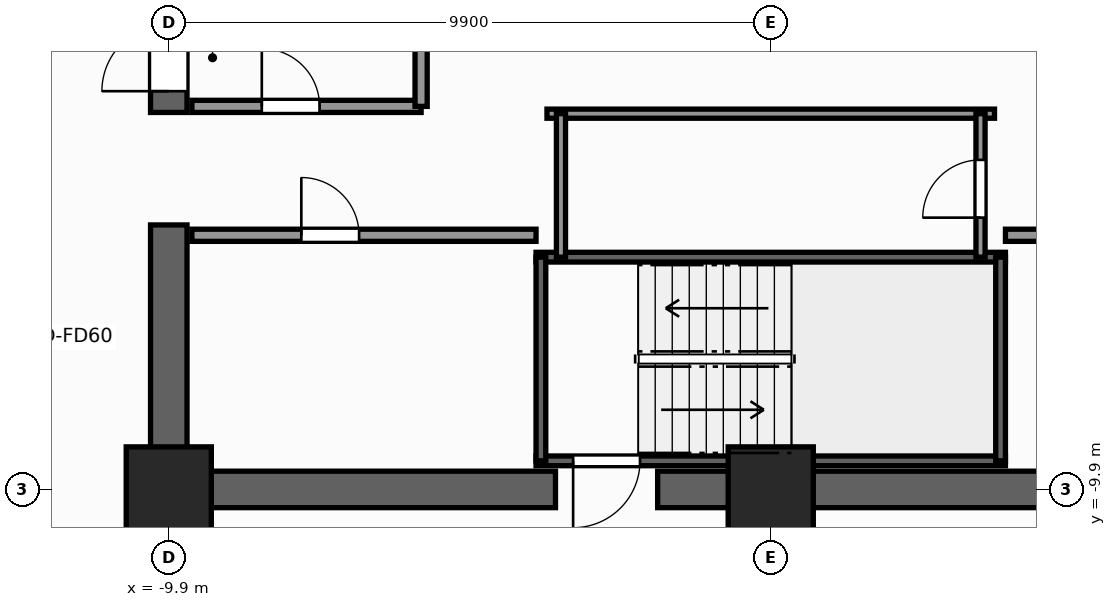
"""IFC4 building model, lengths in metres.
Left out: names, types, materials, properties, quantities, classifications, styles, units other than length and angle.
Written with IfcOpenShell. Run it as: python <this file> out.ifc"""

import sys

from ifc_helpers import new_model, si_unit, direction, frame, frame_2d, origin, origin_2d, place, context, subcontext, project, spatial, rectangle, extrude, element, fill, save


model = new_model("IFC4")
c1 = context("Model", 3, precision=1e-05, world=origin(), true_north=direction((0.0, 1.0)))
c2 = subcontext(c1, "Body", "Model", "MODEL_VIEW")
j1 = project(units=[si_unit("LENGTHUNIT", "METRE"), si_unit("PLANEANGLEUNIT", "RADIAN")], contexts=[c1])
p1 = place(None, origin())
s1 = spatial("IfcSite", under=j1, at=p1, CompositionType="ELEMENT")
p2 = place(p1, origin())
s2 = spatial("IfcBuilding", under=s1, at=p2, CompositionType="ELEMENT")
p3 = place(p2, frame((0.0, 0.0, 30.4)))
s3 = spatial("IfcBuildingStorey", under=s2, at=p3, CompositionType="ELEMENT", Elevation=30.4)
p4 = place(p3, frame((10.2, -9.9, 0.0), z_axis=(0.0, 0.0, 1.0), x_axis=(-1.0, 0.0, 0.0)))
e1 = element("IfcWall", 1, at=p4, inside=s3, PredefinedType="SHEAR", context=c2, shape_type="SweptSolid", body=[
    extrude(rectangle(XDim=12.06, YDim=0.6, at=frame_2d((6.03, 0.0))), origin(), (0.0, 0.0, 1.0), 3.3),
])
p5 = place(p3, frame((-3.54, -9.9, 0.0), z_axis=(0.0, 0.0, 1.0), x_axis=(-1.0, 0.0, 0.0)))
e2 = element("IfcWall", 2, at=p5, inside=s3, PredefinedType="SHEAR", context=c2, shape_type="SweptSolid", body=[
    extrude(rectangle(XDim=6.66, YDim=0.6, at=frame_2d((3.33, 0.0))), origin(), (0.0, 0.0, 1.0), 3.3),
])
p6 = place(p3, frame((-9.9, -9.6, 0.0), z_axis=(0.0, 0.0, 1.0), x_axis=(0.0, 1.0, 0.0)))
e3 = element("IfcWall", 3, at=p6, inside=s3, PredefinedType="SHEAR", context=c2, shape_type="SweptSolid", body=[
    extrude(rectangle(XDim=4.05, YDim=0.6, at=frame_2d((2.025, 0.0))), origin(), (0.0, 0.0, 1.0), 3.3),
])
p7 = place(p3, frame((-9.9, -3.7, 0.0), z_axis=(0.0, 0.0, 1.0), x_axis=(0.0, 1.0, 0.0)))
e4 = element("IfcWall", 4, at=p7, inside=s3, PredefinedType="SHEAR", context=c2, shape_type="SweptSolid", body=[
    extrude(rectangle(XDim=13.3, YDim=0.6, at=frame_2d((6.65, 0.0))), origin(), (0.0, 0.0, 1.0), 3.3),
])
p8 = place(p7, frame((0.35, 0.0, 0.0)))
e5 = element("IfcOpeningElement", 5, at=p8, cuts=e4, PredefinedType="OPENING", context=c2, shape_type="SweptSolid", body=[
    extrude(rectangle(XDim=1.1, YDim=2.2, at=frame_2d((0.55, 1.1))), frame((0.0, 0.31, 0.0), z_axis=(0.0, -1.0, 0.0), x_axis=(1.0, 0.0, 0.0)), (0.0, 0.0, 1.0), 0.62),
])
for number, where, z_axis, x_axis in (
    (6, (-9.9, -9.9, 0.0), (0.0, 0.0, 1.0), (1.0, 0.0, 0.0)),
    (7, (0.0, -9.9, 0.0), (0.0, 0.0, 1.0), (1.0, 0.0, 0.0)),
):
    element("IfcColumn", number, at=place(p3, frame(where, z_axis=z_axis, x_axis=x_axis)), inside=s3, PredefinedType="COLUMN", context=c2, shape_type="SweptSolid", body=[
        extrude(rectangle(XDim=1.4, YDim=1.4, at=origin_2d()), origin(), (0.0, 0.0, 1.0), 3.3),
    ])
p9 = place(p3, frame((3.86, -9.43, 0.0), z_axis=(0.0, 0.0, 1.0), x_axis=(-1.0, 0.0, 0.0)))
e8 = element("IfcWall", 8, at=p9, inside=s3, PredefinedType="SHEAR", context=c2, shape_type="SweptSolid", body=[
    extrude(rectangle(XDim=7.72, YDim=0.16, at=frame_2d((3.86, 0.0))), origin(), (0.0, 0.0, 1.0), 3.3),
])
p10 = place(p9, frame((6.01, 0.0, 0.0)))
e9 = element("IfcOpeningElement", 9, at=p10, cuts=e8, PredefinedType="OPENING", context=c2, shape_type="SweptSolid", body=[
    extrude(rectangle(XDim=1.1, YDim=2.2, at=frame_2d((0.55, 1.1))), frame((0.0, 0.09, 0.0), z_axis=(0.0, -1.0, 0.0), x_axis=(1.0, 0.0, 0.0)), (0.0, 0.0, 1.0), 0.18),
])
p11 = place(p3, frame((-3.86, -6.08, 0.0), z_axis=(0.0, 0.0, 1.0), x_axis=(1.0, 0.0, 0.0)))
e10 = element("IfcWall", 10, at=p11, inside=s3, PredefinedType="SHEAR", context=c2, shape_type="SweptSolid", body=[
    extrude(rectangle(XDim=7.72, YDim=0.16, at=frame_2d((3.86, 0.0))), origin(), (0.0, 0.0, 1.0), 3.3),
])
for number, where, z_axis, x_axis in (
    (11, (-3.78, -9.43, 0.0), (0.0, 0.0, 1.0), (0.0, 1.0, 0.0)),
    (12, (3.78, -9.43, 0.0), (0.0, 0.0, 1.0), (0.0, 1.0, 0.0)),
):
    element("IfcWall", number, at=place(p3, frame(where, z_axis=z_axis, x_axis=x_axis)), inside=s3, PredefinedType="SHEAR", context=c2, shape_type="SweptSolid", body=[
        extrude(rectangle(XDim=3.35, YDim=0.16, at=frame_2d((1.675, 0.0))), origin(), (0.0, 0.0, 1.0), 3.3),
    ])
p12 = place(p3, frame((-9.52, -3.6, 0.0), z_axis=(0.0, 0.0, 1.0), x_axis=(1.0, 0.0, 0.0)))
e13 = element("IfcWall", 13, at=p12, inside=s3, PredefinedType="SOLIDWALL", context=c2, shape_type="SweptSolid", body=[
    extrude(rectangle(XDim=3.77, YDim=0.2, at=frame_2d((1.885, 0.0))), origin(), (0.0, 0.0, 1.0), 3.06),
])
p13 = place(p12, frame((1.15, 0.0, 0.0)))
e14 = element("IfcOpeningElement", 14, at=p13, cuts=e13, PredefinedType="OPENING", context=c2, shape_type="SweptSolid", body=[
    extrude(rectangle(XDim=0.95, YDim=2.06, at=frame_2d((0.475, 1.03))), frame((0.0, 0.11, 0.0), z_axis=(0.0, -1.0, 0.0), x_axis=(1.0, 0.0, 0.0)), (0.0, 0.0, 1.0), 0.22),
])
p14 = place(p3, frame((-5.75, -3.6, 0.0), z_axis=(0.0, 0.0, 1.0), x_axis=(0.0, 1.0, 0.0)))
e15 = element("IfcWall", 15, at=p14, inside=s3, PredefinedType="SOLIDWALL", context=c2, shape_type="SweptSolid", body=[
    extrude(rectangle(XDim=5.57, YDim=0.2, at=frame_2d((2.785, 0.0))), origin(), (0.0, 0.0, 1.0), 3.06),
])
p15 = place(p14, frame((2.75, 0.0, 0.0)))
e16 = element("IfcOpeningElement", 16, at=p15, cuts=e15, PredefinedType="OPENING", context=c2, shape_type="SweptSolid", body=[
    extrude(rectangle(XDim=1.1, YDim=2.2, at=frame_2d((0.55, 1.1))), frame((0.0, 0.11, 0.0), z_axis=(0.0, -1.0, 0.0), x_axis=(1.0, 0.0, 0.0)), (0.0, 0.0, 1.0), 0.22),
])
p16 = place(p3, frame((-9.52, -5.72, 0.0), z_axis=(0.0, 0.0, 1.0), x_axis=(1.0, 0.0, 0.0)))
e17 = element("IfcWall", 17, at=p16, inside=s3, PredefinedType="SOLIDWALL", context=c2, shape_type="SweptSolid", body=[
    extrude(rectangle(XDim=5.66, YDim=0.2, at=frame_2d((2.83, 0.0))), origin(), (0.0, 0.0, 1.0), 3.06),
])
p17 = place(p16, frame((1.8, 0.0, 0.0)))
e18 = element("IfcOpeningElement", 18, at=p17, cuts=e17, PredefinedType="OPENING", context=c2, shape_type="SweptSolid", body=[
    extrude(rectangle(XDim=0.95, YDim=2.06, at=frame_2d((0.475, 1.03))), frame((0.0, 0.11, 0.0), z_axis=(0.0, -1.0, 0.0), x_axis=(1.0, 0.0, 0.0)), (0.0, 0.0, 1.0), 0.22),
])
p18 = place(p3, frame((3.86, -5.72, 0.0), z_axis=(0.0, 0.0, 1.0), x_axis=(1.0, 0.0, 0.0)))
e19 = element("IfcWall", 19, at=p18, inside=s3, PredefinedType="SOLIDWALL", context=c2, shape_type="SweptSolid", body=[
    extrude(rectangle(XDim=5.66, YDim=0.2, at=frame_2d((2.83, 0.0))), origin(), (0.0, 0.0, 1.0), 3.06),
])
p19 = place(p18, frame((1.8, 0.0, 0.0)))
e20 = element("IfcOpeningElement", 20, at=p19, cuts=e19, PredefinedType="OPENING", context=c2, shape_type="SweptSolid", body=[
    extrude(rectangle(XDim=0.95, YDim=2.06, at=frame_2d((0.475, 1.03))), frame((0.0, 0.11, 0.0), z_axis=(0.0, -1.0, 0.0), x_axis=(1.0, 0.0, 0.0)), (0.0, 0.0, 1.0), 0.22),
])
p20 = place(p3, frame((-3.68, -3.72, 0.0), z_axis=(0.0, 0.0, 1.0), x_axis=(1.0, 0.0, 0.0)))
e21 = element("IfcWall", 21, at=p20, inside=s3, PredefinedType="PARTITIONING", context=c2, shape_type="SweptSolid", body=[
    extrude(rectangle(XDim=7.36, YDim=0.15, at=frame_2d((3.68, 0.0))), origin(), (0.0, 0.0, 1.0), 3.06),
])
p21 = place(p3, frame((3.45, -6.08, 0.0), z_axis=(0.0, 0.0, 1.0), x_axis=(0.0, 1.0, 0.0)))
e22 = element("IfcWall", 22, at=p21, inside=s3, PredefinedType="PARTITIONING", context=c2, shape_type="SweptSolid", body=[
    extrude(rectangle(XDim=2.36, YDim=0.15, at=frame_2d((1.18, 0.0))), origin(), (0.0, 0.0, 1.0), 3.06),
])
p22 = place(p21, frame((0.65, 0.0, 0.0)))
e23 = element("IfcOpeningElement", 23, at=p22, cuts=e22, PredefinedType="OPENING", context=c2, shape_type="SweptSolid", body=[
    extrude(rectangle(XDim=0.95, YDim=2.06, at=frame_2d((0.475, 1.03))), frame((0.0, 0.085, 0.0), z_axis=(0.0, -1.0, 0.0), x_axis=(1.0, 0.0, 0.0)), (0.0, 0.0, 1.0), 0.17),
])
p23 = place(p3, frame((-3.45, -6.08, 0.0), z_axis=(0.0, 0.0, 1.0), x_axis=(0.0, 1.0, 0.0)))
e24 = element("IfcWall", 24, at=p23, inside=s3, PredefinedType="PARTITIONING", context=c2, shape_type="SweptSolid", body=[
    extrude(rectangle(XDim=2.36, YDim=0.15, at=frame_2d((1.18, 0.0))), origin(), (0.0, 0.0, 1.0), 3.06),
])
p24 = place(p10, origin())
e25 = element("IfcDoor", 25, at=p24, inside=s3, OperationType="SINGLE_SWING_RIGHT", PredefinedType="DOOR", context=c2, shape_type="SweptSolid", body=[
    extrude(rectangle(XDim=1.1, YDim=2.2, at=frame_2d((0.55, 1.1))), frame((0.0, 0.025, 0.0), z_axis=(0.0, -1.0, 0.0), x_axis=(1.0, 0.0, 0.0)), (0.0, 0.0, 1.0), 0.05),
])
fill(e9, e25)
p25 = place(p8, origin())
e26 = element("IfcDoor", 26, at=p25, inside=s3, OperationType="SINGLE_SWING_LEFT", PredefinedType="DOOR", context=c2, shape_type="SweptSolid", body=[
    extrude(rectangle(XDim=1.1, YDim=2.2, at=frame_2d((0.55, 1.1))), frame((0.0, 0.025, 0.0), z_axis=(0.0, -1.0, 0.0), x_axis=(1.0, 0.0, 0.0)), (0.0, 0.0, 1.0), 0.05),
])
fill(e5, e26)
p26 = place(p17, origin())
e27 = element("IfcDoor", 27, at=p26, inside=s3, OperationType="SINGLE_SWING_LEFT", PredefinedType="DOOR", context=c2, shape_type="SweptSolid", body=[
    extrude(rectangle(XDim=0.95, YDim=2.06, at=frame_2d((0.475, 1.03))), frame((0.0, 0.025, 0.0), z_axis=(0.0, -1.0, 0.0), x_axis=(1.0, 0.0, 0.0)), (0.0, 0.0, 1.0), 0.05),
])
fill(e18, e27)
p27 = place(p13, origin())
e28 = element("IfcDoor", 28, at=p27, inside=s3, OperationType="SINGLE_SWING_LEFT", PredefinedType="DOOR", context=c2, shape_type="SweptSolid", body=[
    extrude(rectangle(XDim=0.95, YDim=2.06, at=frame_2d((0.475, 1.03))), frame((0.0, 0.025, 0.0), z_axis=(0.0, -1.0, 0.0), x_axis=(1.0, 0.0, 0.0)), (0.0, 0.0, 1.0), 0.05),
])
fill(e14, e28)
p28 = place(p22, origin())
e29 = element("IfcDoor", 29, at=p28, inside=s3, OperationType="SINGLE_SWING_LEFT", PredefinedType="DOOR", context=c2, shape_type="SweptSolid", body=[
    extrude(rectangle(XDim=0.95, YDim=2.06, at=frame_2d((0.475, 1.03))), frame((0.0, 0.025, 0.0), z_axis=(0.0, -1.0, 0.0), x_axis=(1.0, 0.0, 0.0)), (0.0, 0.0, 1.0), 0.05),
])
fill(e23, e29)
save(model, sys.argv[1])
